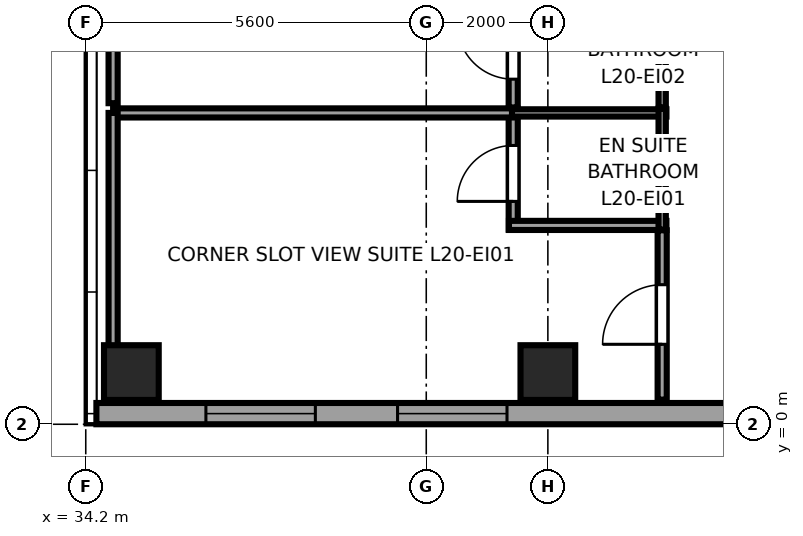
"""IFC4 building model, lengths in metres.
Left out: names, types, materials, properties, quantities, classifications, styles, units other than length and angle.
Written with IfcOpenShell. Run it as: python <this file> out.ifc"""

import sys

from ifc_helpers import new_model, si_unit, direction, frame, frame_2d, origin, origin_2d, place, context, subcontext, project, spatial, rectangle, extrude, source, transform, mapped, element, fill, save


model = new_model("IFC4")
c1 = context("Model", 3, precision=1e-05, world=origin(), true_north=direction((0.0, 1.0)))
c2 = subcontext(c1, "Body", "Model", "MODEL_VIEW")
j1 = project(units=[si_unit("LENGTHUNIT", "METRE"), si_unit("PLANEANGLEUNIT", "RADIAN")], contexts=[c1])
p1 = place(None, origin())
s1 = spatial("IfcSite", under=j1, at=p1, CompositionType="ELEMENT")
p2 = place(p1, origin())
s2 = spatial("IfcBuilding", under=s1, at=p2, CompositionType="ELEMENT")
p3 = place(p2, frame((0.0, 0.0, 81.7)))
s3 = spatial("IfcBuildingStorey", under=s2, at=p3, CompositionType="ELEMENT", Elevation=81.7)
m1 = source(origin(), c2, "Body", "SweptSolid", [
    extrude(rectangle(XDim=0.9, YDim=0.9, at=origin_2d()), origin(), (0.0, 0.0, 1.0), 3.55),
])
for number, where, z_axis, x_axis in (
    (1, (34.95, 0.85, 0.0), (0.0, 0.0, 1.0), (1.0, 0.0, 0.0)),
    (2, (41.8, 0.85, 0.0), (0.0, 0.0, 1.0), (1.0, 0.0, 0.0)),
):
    element("IfcColumn", number, at=place(p3, frame(where, z_axis=z_axis, x_axis=x_axis)), inside=s3, PredefinedType="COLUMN", context=c2, shape_type="MappedRepresentation", body=[
        mapped(m1, transform((0.0, 0.0, 0.0), x_axis=(1.0, 0.0, 0.0), y_axis=(0.0, 1.0, 0.0), z_axis=(0.0, 0.0, 1.0), scale=1.0)),
    ])
p4 = place(p3, frame((34.375, 0.175, 0.0), z_axis=(0.0, 0.0, 1.0), x_axis=(1.0, 0.0, 0.0)))
e3 = element("IfcWall", 3, at=p4, inside=s3, PredefinedType="SOLIDWALL", context=c2, shape_type="SweptSolid", body=[
    extrude(rectangle(XDim=18.008, YDim=0.35, at=frame_2d((9.004, 0.0))), origin(), (0.0, 0.0, 1.0), 3.37),
])
p5 = place(p4, frame((1.801, 0.0, 0.68)))
e4 = element("IfcOpeningElement", 4, at=p5, cuts=e3, PredefinedType="OPENING", context=c2, shape_type="SweptSolid", body=[
    extrude(rectangle(XDim=1.8, YDim=1.85, at=frame_2d((0.9, 0.925))), frame((0.0, 0.185, 0.0), z_axis=(0.0, -1.0, 0.0), x_axis=(1.0, 0.0, 0.0)), (0.0, 0.0, 1.0), 0.37),
])
p6 = place(p4, frame((4.953, 0.0, 0.68)))
e5 = element("IfcOpeningElement", 5, at=p6, cuts=e3, PredefinedType="OPENING", context=c2, shape_type="SweptSolid", body=[
    extrude(rectangle(XDim=1.8, YDim=1.85, at=frame_2d((0.9, 0.925))), frame((0.0, 0.185, 0.0), z_axis=(0.0, -1.0, 0.0), x_axis=(1.0, 0.0, 0.0)), (0.0, 0.0, 1.0), 0.37),
])
p7 = place(p3, frame((41.23, 3.2, 0.0), z_axis=(0.0, 0.0, 1.0), x_axis=(0.0, 1.0, 0.0)))
e6 = element("IfcWall", 6, at=p7, inside=s3, PredefinedType="PARTITIONING", context=c2, shape_type="SweptSolid", body=[
    extrude(rectangle(XDim=1.99, YDim=0.15, at=frame_2d((0.995, 0.0))), origin(), (0.0, 0.0, 1.0), 3.37),
])
p8 = place(p7, frame((0.465, 0.0, 0.0)))
e7 = element("IfcOpeningElement", 7, at=p8, cuts=e6, PredefinedType="OPENING", context=c2, shape_type="SweptSolid", body=[
    extrude(rectangle(XDim=0.92, YDim=2.01, at=frame_2d((0.46, 1.005))), frame((0.0, 0.085, 0.0), z_axis=(0.0, -1.0, 0.0), x_axis=(1.0, 0.0, 0.0)), (0.0, 0.0, 1.0), 0.17),
])
p9 = place(p3, frame((41.16, 3.27, 0.0), z_axis=(0.0, 0.0, 1.0), x_axis=(1.0, 0.0, 0.0)))
e8 = element("IfcWall", 8, at=p9, inside=s3, PredefinedType="PARTITIONING", context=c2, shape_type="SweptSolid", body=[
    extrude(rectangle(XDim=2.59, YDim=0.15, at=frame_2d((1.295, 0.0))), origin(), (0.0, 0.0, 1.0), 3.37),
])
p10 = place(p3, frame((41.16, 5.12, 0.0), z_axis=(0.0, 0.0, 1.0), x_axis=(1.0, 0.0, 0.0)))
e9 = element("IfcWall", 9, at=p10, inside=s3, PredefinedType="PLUMBINGWALL", context=c2, shape_type="SweptSolid", body=[
    extrude(rectangle(XDim=2.59, YDim=0.12, at=frame_2d((1.295, 0.0))), origin(), (0.0, 0.0, 1.0), 3.37),
])
p11 = place(p3, frame((43.68, 3.2, 0.0), z_axis=(0.0, 0.0, 1.0), x_axis=(0.0, 1.0, 0.0)))
e10 = element("IfcWall", 10, at=p11, inside=s3, PredefinedType="PLUMBINGWALL", context=c2, shape_type="SweptSolid", body=[
    extrude(rectangle(XDim=1.99, YDim=0.12, at=frame_2d((0.995, 0.0))), origin(), (0.0, 0.0, 1.0), 3.37),
])
p12 = place(p3, frame((41.23, 5.21, 0.0), z_axis=(0.0, 0.0, 1.0), x_axis=(0.0, 1.0, 0.0)))
e11 = element("IfcWall", 11, at=p12, inside=s3, PredefinedType="PARTITIONING", context=c2, shape_type="SweptSolid", body=[
    extrude(rectangle(XDim=1.99, YDim=0.15, at=frame_2d((0.995, 0.0))), origin(), (0.0, 0.0, 1.0), 3.37),
])
p13 = place(p12, frame((0.465, 0.0, 0.0)))
e12 = element("IfcOpeningElement", 12, at=p13, cuts=e11, PredefinedType="OPENING", context=c2, shape_type="SweptSolid", body=[
    extrude(rectangle(XDim=0.92, YDim=2.01, at=frame_2d((0.46, 1.005))), frame((0.0, 0.085, 0.0), z_axis=(0.0, -1.0, 0.0), x_axis=(1.0, 0.0, 0.0)), (0.0, 0.0, 1.0), 0.17),
])
p14 = place(p3, frame((43.68, 5.21, 0.0), z_axis=(0.0, 0.0, 1.0), x_axis=(0.0, 1.0, 0.0)))
e13 = element("IfcWall", 13, at=p14, inside=s3, PredefinedType="PLUMBINGWALL", context=c2, shape_type="SweptSolid", body=[
    extrude(rectangle(XDim=1.99, YDim=0.12, at=frame_2d((0.995, 0.0))), origin(), (0.0, 0.0, 1.0), 3.37),
])
p15 = place(p3, frame((43.68, 0.405, 0.0), z_axis=(0.0, 0.0, 1.0), x_axis=(0.0, 1.0, 0.0)))
e14 = element("IfcWall", 14, at=p15, inside=s3, PredefinedType="PARTITIONING", context=c2, shape_type="SweptSolid", body=[
    extrude(rectangle(XDim=2.785, YDim=0.15, at=frame_2d((1.393, 0.0))), origin(), (0.0, 0.0, 1.0), 3.37),
])
p16 = place(p15, frame((0.91, 0.0, 0.0)))
e15 = element("IfcOpeningElement", 15, at=p16, cuts=e14, PredefinedType="OPENING", context=c2, shape_type="SweptSolid", body=[
    extrude(rectangle(XDim=0.98, YDim=2.12, at=frame_2d((0.49, 1.06))), frame((0.0, 0.085, 0.0), z_axis=(0.0, -1.0, 0.0), x_axis=(1.0, 0.0, 0.0)), (0.0, 0.0, 1.0), 0.17),
])
p17 = place(p3, frame((34.65, 5.12, 0.0), z_axis=(0.0, 0.0, 1.0), x_axis=(1.0, 0.0, 0.0)))
e16 = element("IfcWall", 16, at=p17, inside=s3, PredefinedType="PARTITIONING", context=c2, shape_type="SweptSolid", body=[
    extrude(rectangle(XDim=6.56, YDim=0.15, at=frame_2d((3.28, 0.0))), origin(), (0.0, 0.0, 1.0), 3.37),
])
p18 = place(p3, frame((34.65, 0.405, 0.0), z_axis=(0.0, 0.0, 1.0), x_axis=(0.0, 1.0, 0.0)))
e17 = element("IfcWall", 17, at=p18, inside=s3, PredefinedType="PARTITIONING", context=c2, shape_type="SweptSolid", body=[
    extrude(rectangle(XDim=4.715, YDim=0.15, at=frame_2d((2.357, 0.0))), origin(), (0.0, 0.0, 1.0), 3.37),
])
p19 = place(p3, frame((34.65, 5.28, 0.0), z_axis=(0.0, 0.0, 1.0), x_axis=(0.0, 1.0, 0.0)))
e18 = element("IfcWall", 18, at=p19, inside=s3, PredefinedType="PARTITIONING", context=c2, shape_type="SweptSolid", body=[
    extrude(rectangle(XDim=4.84, YDim=0.15, at=frame_2d((2.42, 0.0))), origin(), (0.0, 0.0, 1.0), 3.37),
])
m2 = source(origin(), c2, "Body", "SweptSolid", [
    extrude(rectangle(XDim=1.8, YDim=1.85, at=frame_2d((0.9, 0.925))), frame((0.0, 0.09, 0.0), z_axis=(0.0, -1.0, 0.0), x_axis=(1.0, 0.0, 0.0)), (0.0, 0.0, 1.0), 0.06),
])
p20 = place(p5, origin())
e19 = element("IfcWindow", 19, at=p20, inside=s3, PartitioningType="TRIPLE_PANEL_HORIZONTAL", PredefinedType="WINDOW", context=c2, shape_type="MappedRepresentation", body=[
    mapped(m2, transform((0.0, 0.0, 0.0), x_axis=(1.0, 0.0, 0.0), y_axis=(0.0, 1.0, 0.0), z_axis=(0.0, 0.0, 1.0), scale=1.0)),
])
fill(e4, e19)
p21 = place(p6, origin())
e20 = element("IfcWindow", 20, at=p21, inside=s3, PartitioningType="TRIPLE_PANEL_HORIZONTAL", PredefinedType="WINDOW", context=c2, shape_type="MappedRepresentation", body=[
    mapped(m2, transform((0.0, 0.0, 0.0), x_axis=(1.0, 0.0, 0.0), y_axis=(0.0, 1.0, 0.0), z_axis=(0.0, 0.0, 1.0), scale=1.0)),
])
fill(e5, e20)
m3 = source(origin(), c2, "Body", "SweptSolid", [
    extrude(rectangle(XDim=0.92, YDim=2.01, at=frame_2d((0.46, 1.005))), frame((0.0, 0.025, 0.0), z_axis=(0.0, -1.0, 0.0), x_axis=(1.0, 0.0, 0.0)), (0.0, 0.0, 1.0), 0.05),
])
p22 = place(p8, origin())
e21 = element("IfcDoor", 21, at=p22, inside=s3, OperationType="SINGLE_SWING_LEFT", PredefinedType="DOOR", context=c2, shape_type="MappedRepresentation", body=[
    mapped(m3, transform((0.0, 0.0, 0.0), x_axis=(1.0, 0.0, 0.0), y_axis=(0.0, 1.0, 0.0), z_axis=(0.0, 0.0, 1.0), scale=1.0)),
])
fill(e7, e21)
p23 = place(p13, origin())
e22 = element("IfcDoor", 22, at=p23, inside=s3, OperationType="SINGLE_SWING_RIGHT", PredefinedType="DOOR", context=c2, shape_type="MappedRepresentation", body=[
    mapped(m3, transform((0.0, 0.0, 0.0), x_axis=(1.0, 0.0, 0.0), y_axis=(0.0, 1.0, 0.0), z_axis=(0.0, 0.0, 1.0), scale=1.0)),
])
fill(e12, e22)
m4 = source(origin(), c2, "Body", "SweptSolid", [
    extrude(rectangle(XDim=0.98, YDim=2.12, at=frame_2d((0.49, 1.06))), frame((0.0, 0.025, 0.0), z_axis=(0.0, -1.0, 0.0), x_axis=(1.0, 0.0, 0.0)), (0.0, 0.0, 1.0), 0.05),
])
p24 = place(p16, origin())
e23 = element("IfcDoor", 23, at=p24, inside=s3, OperationType="SINGLE_SWING_LEFT", PredefinedType="DOOR", context=c2, shape_type="MappedRepresentation", body=[
    mapped(m4, transform((0.0, 0.0, 0.0), x_axis=(1.0, 0.0, 0.0), y_axis=(0.0, 1.0, 0.0), z_axis=(0.0, 0.0, 1.0), scale=1.0)),
])
fill(e15, e23)
save(model, sys.argv[1])
